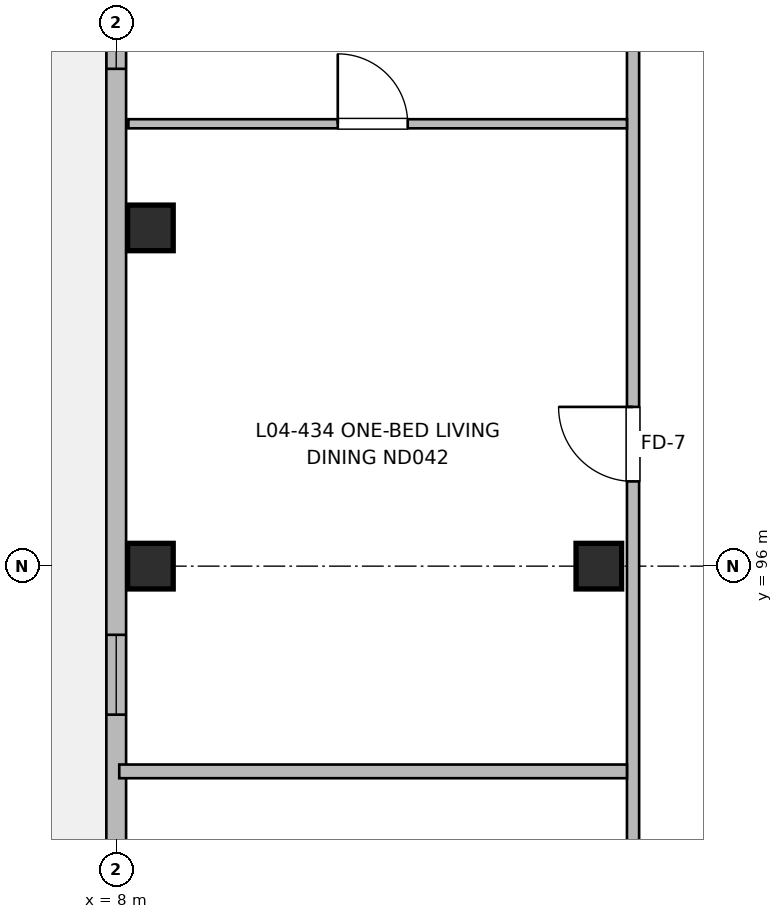
"""IFC4 building model, lengths in metres.
Left out: names, types, materials, properties, quantities, classifications, styles, units other than length and angle.
Written with IfcOpenShell. Run it as: python <this file> out.ifc"""

import sys

from ifc_helpers import new_model, si_unit, direction, frame, frame_2d, origin, origin_2d, place, context, subcontext, project, spatial, rectangle, extrude, element, fill, save


model = new_model("IFC4")
c1 = context("Model", 3, precision=1e-05, world=origin(), true_north=direction((0.0, 1.0)))
c2 = subcontext(c1, "Body", "Model", "MODEL_VIEW")
j1 = project(units=[si_unit("LENGTHUNIT", "METRE"), si_unit("PLANEANGLEUNIT", "RADIAN")], contexts=[c1])
p1 = place(None, origin())
s1 = spatial("IfcSite", under=j1, at=p1, CompositionType="ELEMENT")
p2 = place(p1, origin())
s2 = spatial("IfcBuilding", under=s1, at=p2, CompositionType="ELEMENT")
p3 = place(p2, frame((0.0, 0.0, 13.76)))
s3 = spatial("IfcBuildingStorey", under=s2, at=p3, CompositionType="ELEMENT", Elevation=13.76)
for number, where, z_axis, x_axis in (
    (1, (8.45, 96.0, 0.0), (0.0, 0.0, 1.0), (1.0, 0.0, 0.0)),
    (2, (8.45, 100.45, 0.0), (0.0, 0.0, 1.0), (1.0, 0.0, 0.0)),
    (3, (14.35, 96.0, 0.0), (0.0, 0.0, 1.0), (1.0, 0.0, 0.0)),
):
    element("IfcColumn", number, at=place(p3, frame(where, z_axis=z_axis, x_axis=x_axis)), inside=s3, PredefinedType="COLUMN", context=c2, shape_type="SweptSolid", body=[
        extrude(rectangle(XDim=0.6, YDim=0.6, at=origin_2d()), origin(), (0.0, 0.0, 1.0), 3.2),
    ])
p4 = place(p3, frame((8.0, 56.0, 0.0), z_axis=(0.0, 0.0, 1.0), x_axis=(0.0, 1.0, 0.0)))
e4 = element("IfcWall", 4, at=p4, inside=s3, PredefinedType="SOLIDWALL", context=c2, shape_type="SweptSolid", body=[
    extrude(rectangle(XDim=60.0, YDim=0.26, at=frame_2d((30.0, 0.0))), origin(), (0.0, 0.0, 1.0), 2.98),
])
p5 = place(p4, frame((3.686, 0.0, 0.0)))
e5 = element("IfcOpeningElement", 5, at=p5, cuts=e4, PredefinedType="OPENING", context=c2, shape_type="SweptSolid", body=[
    extrude(rectangle(XDim=1.2, YDim=2.2, at=frame_2d((0.6, 1.1))), frame((0.0, 0.14, 0.0), z_axis=(0.0, -1.0, 0.0), x_axis=(1.0, 0.0, 0.0)), (0.0, 0.0, 1.0), 0.28),
])
p6 = place(p4, frame((5.586, 0.0, 0.9)))
e6 = element("IfcOpeningElement", 6, at=p6, cuts=e4, PredefinedType="OPENING", context=c2, shape_type="SweptSolid", body=[
    extrude(rectangle(XDim=1.05, YDim=1.15, at=frame_2d((0.525, 0.575))), frame((0.0, 0.14, 0.0), z_axis=(0.0, -1.0, 0.0), x_axis=(1.0, 0.0, 0.0)), (0.0, 0.0, 1.0), 0.28),
])
p7 = place(p4, frame((12.207, 0.0, 0.82)))
e7 = element("IfcOpeningElement", 7, at=p7, cuts=e4, PredefinedType="OPENING", context=c2, shape_type="SweptSolid", body=[
    extrude(rectangle(XDim=1.3, YDim=1.4, at=frame_2d((0.65, 0.7))), frame((0.0, 0.14, 0.0), z_axis=(0.0, -1.0, 0.0), x_axis=(1.0, 0.0, 0.0)), (0.0, 0.0, 1.0), 0.28),
])
p8 = place(p4, frame((19.079, 0.0, 0.67)))
e8 = element("IfcOpeningElement", 8, at=p8, cuts=e4, PredefinedType="OPENING", context=c2, shape_type="SweptSolid", body=[
    extrude(rectangle(XDim=2.1, YDim=1.55, at=frame_2d((1.05, 0.775))), frame((0.0, 0.14, 0.0), z_axis=(0.0, -1.0, 0.0), x_axis=(1.0, 0.0, 0.0)), (0.0, 0.0, 1.0), 0.28),
])
p9 = place(p4, frame((29.325, 0.0, 0.72)))
e9 = element("IfcOpeningElement", 9, at=p9, cuts=e4, PredefinedType="OPENING", context=c2, shape_type="SweptSolid", body=[
    extrude(rectangle(XDim=2.25, YDim=1.5, at=frame_2d((1.125, 0.75))), frame((0.0, 0.14, 0.0), z_axis=(0.0, -1.0, 0.0), x_axis=(1.0, 0.0, 0.0)), (0.0, 0.0, 1.0), 0.28),
])
p10 = place(p4, frame((38.046, 0.0, 0.9)))
e10 = element("IfcOpeningElement", 10, at=p10, cuts=e4, PredefinedType="OPENING", context=c2, shape_type="SweptSolid", body=[
    extrude(rectangle(XDim=1.05, YDim=1.15, at=frame_2d((0.525, 0.575))), frame((0.0, 0.14, 0.0), z_axis=(0.0, -1.0, 0.0), x_axis=(1.0, 0.0, 0.0)), (0.0, 0.0, 1.0), 0.28),
])
p11 = place(p4, frame((46.543, 0.0, 0.9)))
e11 = element("IfcOpeningElement", 11, at=p11, cuts=e4, PredefinedType="OPENING", context=c2, shape_type="SweptSolid", body=[
    extrude(rectangle(XDim=1.2, YDim=1.05, at=frame_2d((0.6, 0.525))), frame((0.0, 0.14, 0.0), z_axis=(0.0, -1.0, 0.0), x_axis=(1.0, 0.0, 0.0)), (0.0, 0.0, 1.0), 0.28),
])
p12 = place(p4, frame((55.839, 0.0, 0.9)))
e12 = element("IfcOpeningElement", 12, at=p12, cuts=e4, PredefinedType="OPENING", context=c2, shape_type="SweptSolid", body=[
    extrude(rectangle(XDim=0.65, YDim=0.95, at=frame_2d((0.325, 0.475))), frame((0.0, 0.14, 0.0), z_axis=(0.0, -1.0, 0.0), x_axis=(1.0, 0.0, 0.0)), (0.0, 0.0, 1.0), 0.28),
])
p13 = place(p3, frame((14.8, 56.16, 0.0), z_axis=(0.0, 0.0, 1.0), x_axis=(0.0, 1.0, 0.0)))
e13 = element("IfcWall", 13, at=p13, inside=s3, PredefinedType="PARTITIONING", context=c2, shape_type="SweptSolid", body=[
    extrude(rectangle(XDim=50.64, YDim=0.16, at=frame_2d((25.32, 0.0))), origin(), (0.0, 0.0, 1.0), 2.935),
])
p14 = place(p13, frame((12.84, 0.0, 0.0)))
e14 = element("IfcOpeningElement", 14, at=p14, cuts=e13, PredefinedType="OPENING", context=c2, shape_type="SweptSolid", body=[
    extrude(rectangle(XDim=1.1, YDim=2.15, at=frame_2d((0.55, 1.075))), frame((0.0, 0.09, 0.0), z_axis=(0.0, -1.0, 0.0), x_axis=(1.0, 0.0, 0.0)), (0.0, 0.0, 1.0), 0.18),
])
p15 = place(p13, frame((19.24, 0.0, 0.0)))
e15 = element("IfcOpeningElement", 15, at=p15, cuts=e13, PredefinedType="OPENING", context=c2, shape_type="SweptSolid", body=[
    extrude(rectangle(XDim=1.6, YDim=2.15, at=frame_2d((0.8, 1.075))), frame((0.0, 0.09, 0.0), z_axis=(0.0, -1.0, 0.0), x_axis=(1.0, 0.0, 0.0)), (0.0, 0.0, 1.0), 0.18),
])
p16 = place(p13, frame((1.8, 0.0, 0.0)))
e16 = element("IfcOpeningElement", 16, at=p16, cuts=e13, PredefinedType="OPENING", context=c2, shape_type="SweptSolid", body=[
    extrude(rectangle(XDim=0.96, YDim=2.15, at=frame_2d((0.48, 1.075))), frame((0.0, 0.09, 0.0), z_axis=(0.0, -1.0, 0.0), x_axis=(1.0, 0.0, 0.0)), (0.0, 0.0, 1.0), 0.18),
])
p17 = place(p13, frame((32.745, 0.0, 0.0)))
e17 = element("IfcOpeningElement", 17, at=p17, cuts=e13, PredefinedType="OPENING", context=c2, shape_type="SweptSolid", body=[
    extrude(rectangle(XDim=0.98, YDim=2.15, at=frame_2d((0.49, 1.075))), frame((0.0, 0.09, 0.0), z_axis=(0.0, -1.0, 0.0), x_axis=(1.0, 0.0, 0.0)), (0.0, 0.0, 1.0), 0.18),
])
p18 = place(p13, frame((40.955, 0.0, 0.0)))
e18 = element("IfcOpeningElement", 18, at=p18, cuts=e13, PredefinedType="OPENING", context=c2, shape_type="SweptSolid", body=[
    extrude(rectangle(XDim=0.98, YDim=2.15, at=frame_2d((0.49, 1.075))), frame((0.0, 0.09, 0.0), z_axis=(0.0, -1.0, 0.0), x_axis=(1.0, 0.0, 0.0)), (0.0, 0.0, 1.0), 0.18),
])
p19 = place(p3, frame((8.04, 93.3, 0.0), z_axis=(0.0, 0.0, 1.0), x_axis=(1.0, 0.0, 0.0)))
e19 = element("IfcWall", 19, at=p19, inside=s3, PredefinedType="PARTITIONING", context=c2, shape_type="SweptSolid", body=[
    extrude(rectangle(XDim=6.68, YDim=0.18, at=frame_2d((3.34, 0.0))), origin(), (0.0, 0.0, 1.0), 2.935),
])
p20 = place(p3, frame((8.16, 101.82, 0.0), z_axis=(0.0, 0.0, 1.0), x_axis=(1.0, 0.0, 0.0)))
e20 = element("IfcWall", 20, at=p20, inside=s3, PredefinedType="PARTITIONING", context=c2, shape_type="SweptSolid", body=[
    extrude(rectangle(XDim=6.56, YDim=0.12, at=frame_2d((3.28, 0.0))), origin(), (0.0, 0.0, 1.0), 2.935),
])
p21 = place(p20, frame((2.755, 0.0, 0.0)))
e21 = element("IfcOpeningElement", 21, at=p21, cuts=e20, PredefinedType="OPENING", context=c2, shape_type="SweptSolid", body=[
    extrude(rectangle(XDim=0.92, YDim=2.1, at=frame_2d((0.46, 1.05))), frame((0.0, 0.07, 0.0), z_axis=(0.0, -1.0, 0.0), x_axis=(1.0, 0.0, 0.0)), (0.0, 0.0, 1.0), 0.14),
])
p22 = place(p10, origin())
e22 = element("IfcWindow", 22, at=p22, inside=s3, PartitioningType="SINGLE_PANEL", PredefinedType="WINDOW", context=c2, shape_type="SweptSolid", body=[
    extrude(rectangle(XDim=1.05, YDim=1.15, at=frame_2d((0.525, 0.575))), frame((0.0, 0.03, 0.0), z_axis=(0.0, -1.0, 0.0), x_axis=(1.0, 0.0, 0.0)), (0.0, 0.0, 1.0), 0.06),
])
fill(e10, e22)
p23 = place(p11, origin())
e23 = element("IfcWindow", 23, at=p23, inside=s3, PartitioningType="SINGLE_PANEL", PredefinedType="WINDOW", context=c2, shape_type="SweptSolid", body=[
    extrude(rectangle(XDim=1.2, YDim=1.05, at=frame_2d((0.6, 0.525))), frame((0.0, 0.03, 0.0), z_axis=(0.0, -1.0, 0.0), x_axis=(1.0, 0.0, 0.0)), (0.0, 0.0, 1.0), 0.06),
])
fill(e11, e23)
p24 = place(p21, origin())
e24 = element("IfcDoor", 24, at=p24, inside=s3, OperationType="SINGLE_SWING_LEFT", PredefinedType="DOOR", context=c2, shape_type="SweptSolid", body=[
    extrude(rectangle(XDim=0.92, YDim=2.1, at=frame_2d((0.46, 1.05))), frame((0.0, 0.025, 0.0), z_axis=(0.0, -1.0, 0.0), x_axis=(1.0, 0.0, 0.0)), (0.0, 0.0, 1.0), 0.05),
])
fill(e21, e24)
p25 = place(p18, origin())
e25 = element("IfcDoor", 25, at=p25, inside=s3, OperationType="SINGLE_SWING_RIGHT", PredefinedType="DOOR", context=c2, shape_type="SweptSolid", body=[
    extrude(rectangle(XDim=0.98, YDim=2.15, at=frame_2d((0.49, 1.075))), frame((0.0, 0.025, 0.0), z_axis=(0.0, -1.0, 0.0), x_axis=(1.0, 0.0, 0.0)), (0.0, 0.0, 1.0), 0.05),
])
fill(e18, e25)
save(model, sys.argv[1])
